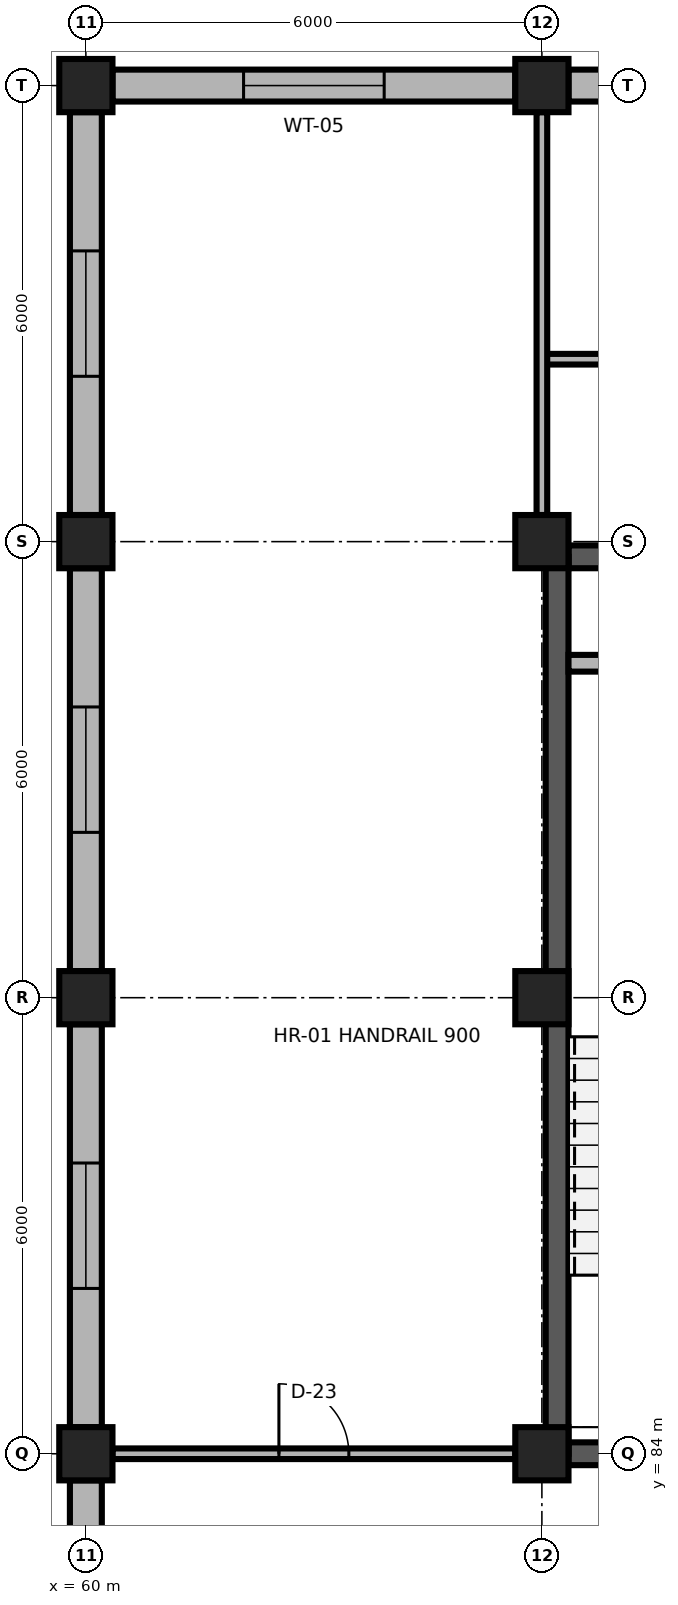
"""IFC4 building model, lengths in metres.
Left out: names, types, materials, properties, quantities, classifications, styles, units other than length and angle.
Written with IfcOpenShell. Run it as: python <this file> out.ifc"""

import sys

from ifc_helpers import new_model, si_unit, direction, frame, frame_2d, origin, origin_2d, place, context, subcontext, project, spatial, rectangle, extrude, element, fill, save


model = new_model("IFC4")
c1 = context("Model", 3, precision=1e-05, world=origin(), true_north=direction((0.0, 1.0)))
c2 = subcontext(c1, "Body", "Model", "MODEL_VIEW")
j1 = project(units=[si_unit("LENGTHUNIT", "METRE"), si_unit("PLANEANGLEUNIT", "RADIAN")], contexts=[c1])
p1 = place(None, origin())
s1 = spatial("IfcSite", under=j1, at=p1, CompositionType="ELEMENT")
p2 = place(p1, origin())
s2 = spatial("IfcBuilding", under=s1, at=p2, CompositionType="ELEMENT")
p3 = place(p2, frame((0.0, 0.0, 44.4)))
s3 = spatial("IfcBuildingStorey", under=s2, at=p3, CompositionType="ELEMENT", Elevation=44.4)
for number, where, z_axis, x_axis in (
    (1, (60.0, 84.0, 0.0), (0.0, 0.0, 1.0), (1.0, 0.0, 0.0)),
    (2, (66.0, 84.0, 0.0), (0.0, 0.0, 1.0), (1.0, 0.0, 0.0)),
    (3, (60.0, 90.0, 0.0), (0.0, 0.0, 1.0), (1.0, 0.0, 0.0)),
    (4, (66.0, 90.0, 0.0), (0.0, 0.0, 1.0), (1.0, 0.0, 0.0)),
    (5, (60.0, 96.0, 0.0), (0.0, 0.0, 1.0), (1.0, 0.0, 0.0)),
    (6, (66.0, 96.0, 0.0), (0.0, 0.0, 1.0), (1.0, 0.0, 0.0)),
    (7, (60.0, 102.0, 0.0), (0.0, 0.0, 1.0), (1.0, 0.0, 0.0)),
    (8, (66.0, 102.0, 0.0), (0.0, 0.0, 1.0), (1.0, 0.0, 0.0)),
):
    element("IfcColumn", number, at=place(p3, frame(where, z_axis=z_axis, x_axis=x_axis)), inside=s3, PredefinedType="COLUMN", context=c2, shape_type="SweptSolid", body=[
        extrude(rectangle(XDim=0.7, YDim=0.7, at=origin_2d()), origin(), (0.0, 0.0, 1.0), 3.9),
    ])
p4 = place(p3, frame((60.35, 102.0, 0.0), z_axis=(0.0, 0.0, 1.0), x_axis=(1.0, 0.0, 0.0)))
e9 = element("IfcWall", 9, at=p4, inside=s3, PredefinedType="SOLIDWALL", context=c2, shape_type="SweptSolid", body=[
    extrude(rectangle(XDim=5.3, YDim=0.42, at=frame_2d((2.65, 0.0))), origin(), (0.0, 0.0, 1.0), 3.32),
])
p5 = place(p4, frame((1.725, 0.0, 0.85)))
e10 = element("IfcOpeningElement", 10, at=p5, cuts=e9, PredefinedType="OPENING", context=c2, shape_type="SweptSolid", body=[
    extrude(rectangle(XDim=1.85, YDim=2.0, at=frame_2d((0.925, 1.0))), frame((0.0, 0.225, 0.0), z_axis=(0.0, -1.0, 0.0), x_axis=(1.0, 0.0, 0.0)), (0.0, 0.0, 1.0), 0.45),
])
p6 = place(p3, frame((66.35, 102.0, 0.0), z_axis=(0.0, 0.0, 1.0), x_axis=(1.0, 0.0, 0.0)))
e11 = element("IfcWall", 11, at=p6, inside=s3, PredefinedType="SOLIDWALL", context=c2, shape_type="SweptSolid", body=[
    extrude(rectangle(XDim=5.3, YDim=0.42, at=frame_2d((2.65, 0.0))), origin(), (0.0, 0.0, 1.0), 3.32),
])
p7 = place(p6, frame((1.725, 0.0, 0.85)))
e12 = element("IfcOpeningElement", 12, at=p7, cuts=e11, PredefinedType="OPENING", context=c2, shape_type="SweptSolid", body=[
    extrude(rectangle(XDim=1.85, YDim=2.0, at=frame_2d((0.925, 1.0))), frame((0.0, 0.225, 0.0), z_axis=(0.0, -1.0, 0.0), x_axis=(1.0, 0.0, 0.0)), (0.0, 0.0, 1.0), 0.45),
])
p8 = place(p3, frame((60.0, 78.35, 0.0), z_axis=(0.0, 0.0, 1.0), x_axis=(0.0, 1.0, 0.0)))
e13 = element("IfcWall", 13, at=p8, inside=s3, PredefinedType="SOLIDWALL", context=c2, shape_type="SweptSolid", body=[
    extrude(rectangle(XDim=5.3, YDim=0.42, at=frame_2d((2.65, 0.0))), origin(), (0.0, 0.0, 1.0), 3.32),
])
p9 = place(p8, frame((1.825, 0.0, 0.85)))
e14 = element("IfcOpeningElement", 14, at=p9, cuts=e13, PredefinedType="OPENING", context=c2, shape_type="SweptSolid", body=[
    extrude(rectangle(XDim=1.65, YDim=1.95, at=frame_2d((0.825, 0.975))), frame((0.0, 0.225, 0.0), z_axis=(0.0, -1.0, 0.0), x_axis=(1.0, 0.0, 0.0)), (0.0, 0.0, 1.0), 0.45),
])
p10 = place(p3, frame((60.0, 84.35, 0.0), z_axis=(0.0, 0.0, 1.0), x_axis=(0.0, 1.0, 0.0)))
e15 = element("IfcWall", 15, at=p10, inside=s3, PredefinedType="SOLIDWALL", context=c2, shape_type="SweptSolid", body=[
    extrude(rectangle(XDim=5.3, YDim=0.42, at=frame_2d((2.65, 0.0))), origin(), (0.0, 0.0, 1.0), 3.32),
])
p11 = place(p10, frame((1.825, 0.0, 0.85)))
e16 = element("IfcOpeningElement", 16, at=p11, cuts=e15, PredefinedType="OPENING", context=c2, shape_type="SweptSolid", body=[
    extrude(rectangle(XDim=1.65, YDim=1.95, at=frame_2d((0.825, 0.975))), frame((0.0, 0.225, 0.0), z_axis=(0.0, -1.0, 0.0), x_axis=(1.0, 0.0, 0.0)), (0.0, 0.0, 1.0), 0.45),
])
p12 = place(p3, frame((60.0, 90.35, 0.0), z_axis=(0.0, 0.0, 1.0), x_axis=(0.0, 1.0, 0.0)))
e17 = element("IfcWall", 17, at=p12, inside=s3, PredefinedType="SOLIDWALL", context=c2, shape_type="SweptSolid", body=[
    extrude(rectangle(XDim=5.3, YDim=0.42, at=frame_2d((2.65, 0.0))), origin(), (0.0, 0.0, 1.0), 3.32),
])
p13 = place(p12, frame((1.825, 0.0, 0.85)))
e18 = element("IfcOpeningElement", 18, at=p13, cuts=e17, PredefinedType="OPENING", context=c2, shape_type="SweptSolid", body=[
    extrude(rectangle(XDim=1.65, YDim=1.95, at=frame_2d((0.825, 0.975))), frame((0.0, 0.225, 0.0), z_axis=(0.0, -1.0, 0.0), x_axis=(1.0, 0.0, 0.0)), (0.0, 0.0, 1.0), 0.45),
])
p14 = place(p3, frame((60.0, 96.35, 0.0), z_axis=(0.0, 0.0, 1.0), x_axis=(0.0, 1.0, 0.0)))
e19 = element("IfcWall", 19, at=p14, inside=s3, PredefinedType="SOLIDWALL", context=c2, shape_type="SweptSolid", body=[
    extrude(rectangle(XDim=5.3, YDim=0.42, at=frame_2d((2.65, 0.0))), origin(), (0.0, 0.0, 1.0), 3.32),
])
p15 = place(p14, frame((1.825, 0.0, 0.85)))
e20 = element("IfcOpeningElement", 20, at=p15, cuts=e19, PredefinedType="OPENING", context=c2, shape_type="SweptSolid", body=[
    extrude(rectangle(XDim=1.65, YDim=1.95, at=frame_2d((0.825, 0.975))), frame((0.0, 0.225, 0.0), z_axis=(0.0, -1.0, 0.0), x_axis=(1.0, 0.0, 0.0)), (0.0, 0.0, 1.0), 0.45),
])
p16 = place(p3, frame((66.35, 84.0, 0.0), z_axis=(0.0, 0.0, 1.0), x_axis=(1.0, 0.0, 0.0)))
e21 = element("IfcWall", 21, at=p16, inside=s3, PredefinedType="SHEAR", context=c2, shape_type="SweptSolid", body=[
    extrude(rectangle(XDim=5.3, YDim=0.3, at=frame_2d((2.65, 0.0))), origin(), (0.0, 0.0, 1.0), 3.66),
])
p17 = place(p16, frame((1.975, 0.0, 0.0)))
e22 = element("IfcOpeningElement", 22, at=p17, cuts=e21, PredefinedType="OPENING", context=c2, shape_type="SweptSolid", body=[
    extrude(rectangle(XDim=1.35, YDim=2.2, at=frame_2d((0.675, 1.1))), frame((0.0, 0.165, 0.0), z_axis=(0.0, -1.0, 0.0), x_axis=(1.0, 0.0, 0.0)), (0.0, 0.0, 1.0), 0.33),
])
p18 = place(p3, frame((66.35, 95.8, 0.0), z_axis=(0.0, 0.0, 1.0), x_axis=(1.0, 0.0, 0.0)))
e23 = element("IfcWall", 23, at=p18, inside=s3, PredefinedType="SHEAR", context=c2, shape_type="SweptSolid", body=[
    extrude(rectangle(XDim=5.3, YDim=0.3, at=frame_2d((2.65, 0.0))), origin(), (0.0, 0.0, 1.0), 3.74),
])
p19 = place(p3, frame((66.2, 84.0, 0.0), z_axis=(0.0, 0.0, 1.0), x_axis=(0.0, 1.0, 0.0)))
e24 = element("IfcWall", 24, at=p19, inside=s3, PredefinedType="SHEAR", context=c2, shape_type="SweptSolid", body=[
    extrude(rectangle(XDim=11.8, YDim=0.3, at=frame_2d((5.9, 0.0))), origin(), (0.0, 0.0, 1.0), 3.74),
])
p20 = place(p3, frame((66.35, 94.4, 0.0), z_axis=(0.0, 0.0, 1.0), x_axis=(1.0, 0.0, 0.0)))
e25 = element("IfcWall", 25, at=p20, inside=s3, PredefinedType="PARTITIONING", context=c2, shape_type="SweptSolid", body=[
    extrude(rectangle(XDim=1.1, YDim=0.22, at=frame_2d((0.55, 0.0))), origin(), (0.0, 0.0, 1.0), 3.74),
])
p21 = place(p3, frame((60.35, 84.0, 0.0), z_axis=(0.0, 0.0, 1.0), x_axis=(1.0, 0.0, 0.0)))
e26 = element("IfcWall", 26, at=p21, inside=s3, PredefinedType="PARTITIONING", context=c2, shape_type="SweptSolid", body=[
    extrude(rectangle(XDim=5.3, YDim=0.14, at=frame_2d((2.65, 0.0))), origin(), (0.0, 0.0, 1.0), 3.348),
])
p22 = place(p21, frame((2.19, 0.0, 0.0)))
e27 = element("IfcOpeningElement", 27, at=p22, cuts=e26, PredefinedType="OPENING", context=c2, shape_type="SweptSolid", body=[
    extrude(rectangle(XDim=0.92, YDim=2.15, at=frame_2d((0.46, 1.075))), frame((0.0, 0.085, 0.0), z_axis=(0.0, -1.0, 0.0), x_axis=(1.0, 0.0, 0.0)), (0.0, 0.0, 1.0), 0.17),
])
p23 = place(p3, frame((66.0, 98.4, 0.0), z_axis=(0.0, 0.0, 1.0), x_axis=(1.0, 0.0, 0.0)))
e28 = element("IfcWall", 28, at=p23, inside=s3, PredefinedType="PARTITIONING", context=c2, shape_type="SweptSolid", body=[
    extrude(rectangle(XDim=6.0, YDim=0.14, at=frame_2d((3.0, 0.0))), origin(), (0.0, 0.0, 1.0), 3.74),
])
p24 = place(p23, frame((2.54, 0.0, 0.0)))
e29 = element("IfcOpeningElement", 29, at=p24, cuts=e28, PredefinedType="OPENING", context=c2, shape_type="SweptSolid", body=[
    extrude(rectangle(XDim=0.92, YDim=2.15, at=frame_2d((0.46, 1.075))), frame((0.0, 0.085, 0.0), z_axis=(0.0, -1.0, 0.0), x_axis=(1.0, 0.0, 0.0)), (0.0, 0.0, 1.0), 0.17),
])
p25 = place(p3, frame((66.0, 96.35, 0.0), z_axis=(0.0, 0.0, 1.0), x_axis=(0.0, 1.0, 0.0)))
e30 = element("IfcWall", 30, at=p25, inside=s3, PredefinedType="PARTITIONING", context=c2, shape_type="SweptSolid", body=[
    extrude(rectangle(XDim=5.3, YDim=0.14, at=frame_2d((2.65, 0.0))), origin(), (0.0, 0.0, 1.0), 3.348),
])
p26 = place(p5, origin())
e31 = element("IfcWindow", 31, at=p26, inside=s3, PartitioningType="SINGLE_PANEL", PredefinedType="WINDOW", context=c2, shape_type="SweptSolid", body=[
    extrude(rectangle(XDim=1.85, YDim=2.0, at=frame_2d((0.925, 1.0))), frame((0.0, 0.03, 0.0), z_axis=(0.0, -1.0, 0.0), x_axis=(1.0, 0.0, 0.0)), (0.0, 0.0, 1.0), 0.06),
])
fill(e10, e31)
p27 = place(p11, origin())
e32 = element("IfcWindow", 32, at=p27, inside=s3, PartitioningType="SINGLE_PANEL", PredefinedType="WINDOW", context=c2, shape_type="SweptSolid", body=[
    extrude(rectangle(XDim=1.65, YDim=1.95, at=frame_2d((0.825, 0.975))), frame((0.0, 0.03, 0.0), z_axis=(0.0, -1.0, 0.0), x_axis=(1.0, 0.0, 0.0)), (0.0, 0.0, 1.0), 0.06),
])
fill(e16, e32)
p28 = place(p13, origin())
e33 = element("IfcWindow", 33, at=p28, inside=s3, PartitioningType="SINGLE_PANEL", PredefinedType="WINDOW", context=c2, shape_type="SweptSolid", body=[
    extrude(rectangle(XDim=1.65, YDim=1.95, at=frame_2d((0.825, 0.975))), frame((0.0, 0.03, 0.0), z_axis=(0.0, -1.0, 0.0), x_axis=(1.0, 0.0, 0.0)), (0.0, 0.0, 1.0), 0.06),
])
fill(e18, e33)
p29 = place(p15, origin())
e34 = element("IfcWindow", 34, at=p29, inside=s3, PartitioningType="SINGLE_PANEL", PredefinedType="WINDOW", context=c2, shape_type="SweptSolid", body=[
    extrude(rectangle(XDim=1.65, YDim=1.95, at=frame_2d((0.825, 0.975))), frame((0.0, 0.03, 0.0), z_axis=(0.0, -1.0, 0.0), x_axis=(1.0, 0.0, 0.0)), (0.0, 0.0, 1.0), 0.06),
])
fill(e20, e34)
p30 = place(p22, origin())
e35 = element("IfcDoor", 35, at=p30, inside=s3, OperationType="SINGLE_SWING_LEFT", PredefinedType="DOOR", context=c2, shape_type="SweptSolid", body=[
    extrude(rectangle(XDim=0.92, YDim=2.15, at=frame_2d((0.46, 1.075))), frame((0.0, 0.025, 0.0), z_axis=(0.0, -1.0, 0.0), x_axis=(1.0, 0.0, 0.0)), (0.0, 0.0, 1.0), 0.05),
])
fill(e27, e35)
save(model, sys.argv[1])
